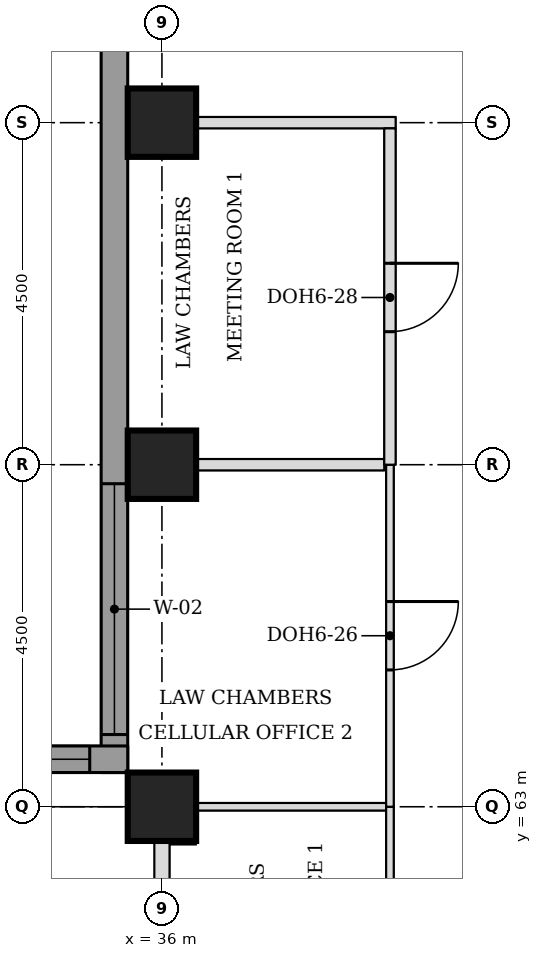
"""IFC4 building model, lengths in metres.
Left out: names, types, materials, properties, quantities, classifications, styles, units other than length and angle.
Written with IfcOpenShell. Run it as: python <this file> out.ifc"""

import sys

from ifc_helpers import new_model, si_unit, direction, frame, frame_2d, origin, origin_2d, place, context, subcontext, project, spatial, rectangle, extrude, element, fill, save


model = new_model("IFC4")
c1 = context("Model", 3, precision=1e-05, world=origin(), true_north=direction((0.0, 1.0)))
c2 = subcontext(c1, "Body", "Model", "MODEL_VIEW")
j1 = project(units=[si_unit("LENGTHUNIT", "METRE"), si_unit("PLANEANGLEUNIT", "RADIAN")], contexts=[c1])
p1 = place(None, origin())
s1 = spatial("IfcSite", under=j1, at=p1, CompositionType="ELEMENT")
p2 = place(p1, origin())
s2 = spatial("IfcBuilding", under=s1, at=p2, CompositionType="ELEMENT")
p3 = place(p2, frame((0.0, 0.0, 184.7)))
s3 = spatial("IfcBuildingStorey", under=s2, at=p3, CompositionType="ELEMENT", Elevation=184.7)
for number, where, z_axis, x_axis in (
    (1, (36.0, 63.0, 0.0), (0.0, 0.0, 1.0), (1.0, 0.0, 0.0)),
    (2, (36.0, 67.5, 0.0), (0.0, 0.0, 1.0), (1.0, 0.0, 0.0)),
    (3, (36.0, 72.0, 0.0), (0.0, 0.0, 1.0), (1.0, 0.0, 0.0)),
):
    element("IfcColumn", number, at=place(p3, frame(where, z_axis=z_axis, x_axis=x_axis)), inside=s3, PredefinedType="COLUMN", context=c2, shape_type="SweptSolid", body=[
        extrude(rectangle(XDim=0.9, YDim=0.9, at=origin_2d()), origin(), (0.0, 0.0, 1.0), 3.7),
    ])
p4 = place(p3, frame((35.375, 76.831, 0.0), z_axis=(0.0, 0.0, 1.0), x_axis=(0.0, -1.0, 0.0)))
e4 = element("IfcWall", 4, at=p4, inside=s3, PredefinedType="STANDARD", context=c2, shape_type="SweptSolid", body=[
    extrude(rectangle(XDim=13.381, YDim=0.35, at=frame_2d((6.691, 0.0))), origin(), (0.0, 0.0, 1.0), 3.525),
])
p5 = place(p4, frame((9.581, 0.0, 0.9)))
e5 = element("IfcOpeningElement", 5, at=p5, cuts=e4, PredefinedType="OPENING", context=c2, shape_type="SweptSolid", body=[
    extrude(rectangle(XDim=3.3, YDim=1.9, at=frame_2d((1.65, 0.95))), frame((0.0, 0.185, 0.0), z_axis=(0.0, -1.0, 0.0), x_axis=(1.0, 0.0, 0.0)), (0.0, 0.0, 1.0), 0.37),
])
p6 = place(p3, frame((35.55, 63.625, 0.0), z_axis=(0.0, 0.0, 1.0), x_axis=(-1.0, 0.0, 0.0)))
e6 = element("IfcWall", 6, at=p6, inside=s3, PredefinedType="STANDARD", context=c2, shape_type="SweptSolid", body=[
    extrude(rectangle(XDim=17.881, YDim=0.35, at=frame_2d((8.941, 0.0))), origin(), (0.0, 0.0, 1.0), 3.525),
])
p7 = place(p6, frame((0.5, 0.0, 0.9)))
e7 = element("IfcOpeningElement", 7, at=p7, cuts=e6, PredefinedType="OPENING", context=c2, shape_type="SweptSolid", body=[
    extrude(rectangle(XDim=3.3, YDim=1.9, at=frame_2d((1.65, 0.95))), frame((0.0, 0.185, 0.0), z_axis=(0.0, -1.0, 0.0), x_axis=(1.0, 0.0, 0.0)), (0.0, 0.0, 1.0), 0.37),
])
p8 = place(p6, frame((9.15, 0.0, 0.9)))
e8 = element("IfcOpeningElement", 8, at=p8, cuts=e6, PredefinedType="OPENING", context=c2, shape_type="SweptSolid", body=[
    extrude(rectangle(XDim=3.3, YDim=1.9, at=frame_2d((1.65, 0.95))), frame((0.0, 0.185, 0.0), z_axis=(0.0, -1.0, 0.0), x_axis=(1.0, 0.0, 0.0)), (0.0, 0.0, 1.0), 0.37),
])
p9 = place(p3, frame((36.45, 63.0, 0.0), z_axis=(0.0, 0.0, 1.0), x_axis=(1.0, 0.0, 0.0)))
e9 = element("IfcWall", 9, at=p9, inside=s3, PredefinedType="PARTITIONING", context=c2, shape_type="SweptSolid", body=[
    extrude(rectangle(XDim=2.5, YDim=0.1, at=frame_2d((1.25, 0.0))), origin(), (0.0, 0.0, 1.0), 3.55),
])
p10 = place(p3, frame((35.55, 67.5, 0.0), z_axis=(0.0, 0.0, 1.0), x_axis=(1.0, 0.0, 0.0)))
e10 = element("IfcWall", 10, at=p10, inside=s3, PredefinedType="PARTITIONING", context=c2, shape_type="SweptSolid", body=[
    extrude(rectangle(XDim=3.375, YDim=0.15, at=frame_2d((1.688, 0.0))), origin(), (0.0, 0.0, 1.0), 3.55),
])
p11 = place(p3, frame((35.55, 72.0, 0.0), z_axis=(0.0, 0.0, 1.0), x_axis=(1.0, 0.0, 0.0)))
e11 = element("IfcWall", 11, at=p11, inside=s3, PredefinedType="PARTITIONING", context=c2, shape_type="SweptSolid", body=[
    extrude(rectangle(XDim=3.525, YDim=0.15, at=frame_2d((1.762, 0.0))), origin(), (0.0, 0.0, 1.0), 3.55),
])
p12 = place(p3, frame((39.0, 58.55, 0.0), z_axis=(0.0, 0.0, 1.0), x_axis=(0.0, 1.0, 0.0)))
e12 = element("IfcWall", 12, at=p12, inside=s3, PredefinedType="PARTITIONING", context=c2, shape_type="SweptSolid", body=[
    extrude(rectangle(XDim=4.45, YDim=0.1, at=frame_2d((2.225, 0.0))), origin(), (0.0, 0.0, 1.0), 3.55),
])
p13 = place(p3, frame((36.0, 60.0, 0.0), z_axis=(0.0, 0.0, 1.0), x_axis=(0.0, 1.0, 0.0)))
e13 = element("IfcWall", 13, at=p13, inside=s3, PredefinedType="PARTITIONING", context=c2, shape_type="SweptSolid", body=[
    extrude(rectangle(XDim=2.55, YDim=0.2, at=frame_2d((1.275, 0.0))), origin(), (0.0, 0.0, 1.0), 2.8),
])
p14 = place(p3, frame((39.0, 63.0, 0.0), z_axis=(0.0, 0.0, 1.0), x_axis=(0.0, 1.0, 0.0)))
e14 = element("IfcWall", 14, at=p14, inside=s3, PredefinedType="PARTITIONING", context=c2, shape_type="SweptSolid", body=[
    extrude(rectangle(XDim=4.5, YDim=0.1, at=frame_2d((2.25, 0.0))), origin(), (0.0, 0.0, 1.0), 3.55),
])
p15 = place(p14, frame((1.8, 0.0, 0.0)))
e15 = element("IfcOpeningElement", 15, at=p15, cuts=e14, PredefinedType="OPENING", context=c2, shape_type="SweptSolid", body=[
    extrude(rectangle(XDim=0.9, YDim=2.1, at=frame_2d((0.45, 1.05))), frame((0.0, 0.06, 0.0), z_axis=(0.0, -1.0, 0.0), x_axis=(1.0, 0.0, 0.0)), (0.0, 0.0, 1.0), 0.12),
])
p16 = place(p3, frame((39.0, 67.5, 0.0), z_axis=(0.0, 0.0, 1.0), x_axis=(0.0, 1.0, 0.0)))
e16 = element("IfcWall", 16, at=p16, inside=s3, PredefinedType="PARTITIONING", context=c2, shape_type="SweptSolid", body=[
    extrude(rectangle(XDim=4.425, YDim=0.15, at=frame_2d((2.212, 0.0))), origin(), (0.0, 0.0, 1.0), 3.55),
])
p17 = place(p16, frame((1.75, 0.0, 0.0)))
e17 = element("IfcOpeningElement", 17, at=p17, cuts=e16, PredefinedType="OPENING", context=c2, shape_type="SweptSolid", body=[
    extrude(rectangle(XDim=0.9, YDim=2.1, at=frame_2d((0.45, 1.05))), frame((0.0, 0.085, 0.0), z_axis=(0.0, -1.0, 0.0), x_axis=(1.0, 0.0, 0.0)), (0.0, 0.0, 1.0), 0.17),
])
p18 = place(p5, origin())
e18 = element("IfcWindow", 18, at=p18, inside=s3, PartitioningType="SINGLE_PANEL", PredefinedType="WINDOW", context=c2, shape_type="SweptSolid", body=[
    extrude(rectangle(XDim=3.3, YDim=1.9, at=frame_2d((1.65, 0.95))), frame((0.0, 0.085, 0.0), z_axis=(0.0, -1.0, 0.0), x_axis=(1.0, 0.0, 0.0)), (0.0, 0.0, 1.0), 0.06),
])
fill(e5, e18)
p19 = place(p7, origin())
e19 = element("IfcWindow", 19, at=p19, inside=s3, PartitioningType="SINGLE_PANEL", PredefinedType="WINDOW", context=c2, shape_type="SweptSolid", body=[
    extrude(rectangle(XDim=3.3, YDim=1.9, at=frame_2d((1.65, 0.95))), frame((0.0, 0.085, 0.0), z_axis=(0.0, -1.0, 0.0), x_axis=(1.0, 0.0, 0.0)), (0.0, 0.0, 1.0), 0.06),
])
fill(e7, e19)
p20 = place(p15, frame((0.9, 0.0, 0.0), z_axis=(0.0, 0.0, 1.0), x_axis=(-1.0, 0.0, 0.0)))
e20 = element("IfcDoor", 20, at=p20, inside=s3, OperationType="SINGLE_SWING_LEFT", PredefinedType="DOOR", context=c2, shape_type="SweptSolid", body=[
    extrude(rectangle(XDim=0.9, YDim=2.1, at=frame_2d((0.45, 1.05))), frame((0.0, 0.025, 0.0), z_axis=(0.0, -1.0, 0.0), x_axis=(1.0, 0.0, 0.0)), (0.0, 0.0, 1.0), 0.05),
])
fill(e15, e20)
p21 = place(p17, frame((0.9, 0.0, 0.0), z_axis=(0.0, 0.0, 1.0), x_axis=(-1.0, 0.0, 0.0)))
e21 = element("IfcDoor", 21, at=p21, inside=s3, OperationType="SINGLE_SWING_LEFT", PredefinedType="DOOR", context=c2, shape_type="SweptSolid", body=[
    extrude(rectangle(XDim=0.9, YDim=2.1, at=frame_2d((0.45, 1.05))), frame((0.0, 0.025, 0.0), z_axis=(0.0, -1.0, 0.0), x_axis=(1.0, 0.0, 0.0)), (0.0, 0.0, 1.0), 0.05),
])
fill(e17, e21)
save(model, sys.argv[1])
